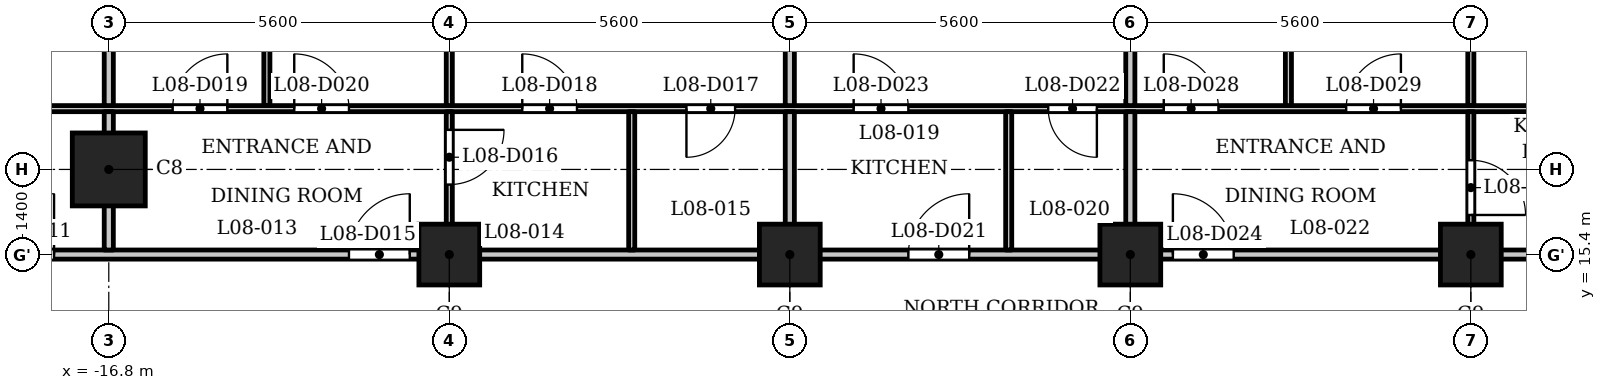
"""IFC4 building model, lengths in metres.
Left out: names, types, materials, properties, quantities, classifications, styles, units other than length and angle.
Written with IfcOpenShell. Run it as: python <this file> out.ifc"""

import sys

from ifc_helpers import new_model, si_unit, direction, frame, frame_2d, origin, origin_2d, place, context, subcontext, project, spatial, rectangle, extrude, element, fill, save


model = new_model("IFC4")
c1 = context("Model", 3, precision=1e-05, world=origin(), true_north=direction((0.0, 1.0)))
c2 = subcontext(c1, "Body", "Model", "MODEL_VIEW")
j1 = project(units=[si_unit("LENGTHUNIT", "METRE"), si_unit("PLANEANGLEUNIT", "RADIAN")], contexts=[c1])
p1 = place(None, origin())
s1 = spatial("IfcSite", under=j1, at=p1, CompositionType="ELEMENT")
p2 = place(p1, origin())
s2 = spatial("IfcBuilding", under=s1, at=p2, CompositionType="ELEMENT")
p3 = place(p2, frame((0.0, 0.0, 37.5)))
s3 = spatial("IfcBuildingStorey", under=s2, at=p3, CompositionType="ELEMENT", Elevation=37.5)
p4 = place(p3, frame((-16.8, 16.8, 0.0), z_axis=(0.0, 0.0, 1.0), x_axis=(1.0, 0.0, 0.0)))
e1 = element("IfcColumn", 1, at=p4, inside=s3, PredefinedType="COLUMN", context=c2, shape_type="SweptSolid", body=[
    extrude(rectangle(XDim=1.2, YDim=1.2, at=origin_2d()), origin(), (0.0, 0.0, 1.0), 3.5),
])
for number, where, z_axis, x_axis in (
    (2, (-11.2, 15.4, 0.0), (0.0, 0.0, 1.0), (1.0, 0.0, 0.0)),
    (3, (-5.6, 15.4, 0.0), (0.0, 0.0, 1.0), (1.0, 0.0, 0.0)),
    (4, (0.0, 15.4, 0.0), (0.0, 0.0, 1.0), (1.0, 0.0, 0.0)),
    (5, (5.6, 15.4, 0.0), (0.0, 0.0, 1.0), (1.0, 0.0, 0.0)),
):
    element("IfcColumn", number, at=place(p3, frame(where, z_axis=z_axis, x_axis=x_axis)), inside=s3, PredefinedType="COLUMN", context=c2, shape_type="SweptSolid", body=[
        extrude(rectangle(XDim=1.0, YDim=1.0, at=origin_2d()), origin(), (0.0, 0.0, 1.0), 3.5),
    ])
p5 = place(p3, frame((-27.484, 15.4, 0.0), z_axis=(0.0, 0.0, 1.0), x_axis=(1.0, 0.0, 0.0)))
e6 = element("IfcWall", 6, at=p5, inside=s3, PredefinedType="PARTITIONING", context=c2, shape_type="SweptSolid", body=[
    extrude(rectangle(XDim=54.968, YDim=0.15, at=frame_2d((27.484, 0.0))), origin(), (0.0, 0.0, 1.0), 3.2),
])
p6 = place(p5, frame((8.784, 0.0, 0.0)))
e7 = element("IfcOpeningElement", 7, at=p6, cuts=e6, PredefinedType="OPENING", context=c2, shape_type="SweptSolid", body=[
    extrude(rectangle(XDim=1.0, YDim=2.1, at=frame_2d((0.5, 1.05))), frame((0.0, 0.085, 0.0), z_axis=(0.0, -1.0, 0.0), x_axis=(1.0, 0.0, 0.0)), (0.0, 0.0, 1.0), 0.17),
])
p7 = place(p5, frame((14.634, 0.0, 0.0)))
e8 = element("IfcOpeningElement", 8, at=p7, cuts=e6, PredefinedType="OPENING", context=c2, shape_type="SweptSolid", body=[
    extrude(rectangle(XDim=1.0, YDim=2.1, at=frame_2d((0.5, 1.05))), frame((0.0, 0.085, 0.0), z_axis=(0.0, -1.0, 0.0), x_axis=(1.0, 0.0, 0.0)), (0.0, 0.0, 1.0), 0.17),
])
p8 = place(p5, frame((23.834, 0.0, 0.0)))
e9 = element("IfcOpeningElement", 9, at=p8, cuts=e6, PredefinedType="OPENING", context=c2, shape_type="SweptSolid", body=[
    extrude(rectangle(XDim=1.0, YDim=2.1, at=frame_2d((0.5, 1.05))), frame((0.0, 0.085, 0.0), z_axis=(0.0, -1.0, 0.0), x_axis=(1.0, 0.0, 0.0)), (0.0, 0.0, 1.0), 0.17),
])
p9 = place(p5, frame((28.184, 0.0, 0.0)))
e10 = element("IfcOpeningElement", 10, at=p9, cuts=e6, PredefinedType="OPENING", context=c2, shape_type="SweptSolid", body=[
    extrude(rectangle(XDim=1.0, YDim=2.1, at=frame_2d((0.5, 1.05))), frame((0.0, 0.085, 0.0), z_axis=(0.0, -1.0, 0.0), x_axis=(1.0, 0.0, 0.0)), (0.0, 0.0, 1.0), 0.17),
])
p10 = place(p5, frame((41.884, 0.0, 0.0)))
e11 = element("IfcOpeningElement", 11, at=p10, cuts=e6, PredefinedType="OPENING", context=c2, shape_type="SweptSolid", body=[
    extrude(rectangle(XDim=1.0, YDim=2.1, at=frame_2d((0.5, 1.05))), frame((0.0, 0.085, 0.0), z_axis=(0.0, -1.0, 0.0), x_axis=(1.0, 0.0, 0.0)), (0.0, 0.0, 1.0), 0.17),
])
p11 = place(p5, frame((48.234, 0.0, 0.0)))
e12 = element("IfcOpeningElement", 12, at=p11, cuts=e6, PredefinedType="OPENING", context=c2, shape_type="SweptSolid", body=[
    extrude(rectangle(XDim=1.0, YDim=2.1, at=frame_2d((0.5, 1.05))), frame((0.0, 0.085, 0.0), z_axis=(0.0, -1.0, 0.0), x_axis=(1.0, 0.0, 0.0)), (0.0, 0.0, 1.0), 0.17),
])
p12 = place(p3, frame((-26.732, 17.8, 0.0), z_axis=(0.0, 0.0, 1.0), x_axis=(1.0, 0.0, 0.0)))
e13 = element("IfcWall", 13, at=p12, inside=s3, PredefinedType="PARTITIONING", context=c2, shape_type="SweptSolid", body=[
    extrude(rectangle(XDim=53.126, YDim=0.1, at=frame_2d((26.563, 0.0))), origin(), (0.0, 0.0, 1.0), 3.2),
])
p13 = place(p12, frame((2.964, 0.0, 0.0)))
e14 = element("IfcOpeningElement", 14, at=p13, cuts=e13, PredefinedType="OPENING", context=c2, shape_type="SweptSolid", body=[
    extrude(rectangle(XDim=0.8, YDim=2.1, at=frame_2d((0.4, 1.05))), frame((0.0, 0.06, 0.0), z_axis=(0.0, -1.0, 0.0), x_axis=(1.0, 0.0, 0.0)), (0.0, 0.0, 1.0), 0.12),
])
p14 = place(p12, frame((7.132, 0.0, 0.0)))
e15 = element("IfcOpeningElement", 15, at=p14, cuts=e13, PredefinedType="OPENING", context=c2, shape_type="SweptSolid", body=[
    extrude(rectangle(XDim=0.9, YDim=2.1, at=frame_2d((0.45, 1.05))), frame((0.0, 0.06, 0.0), z_axis=(0.0, -1.0, 0.0), x_axis=(1.0, 0.0, 0.0)), (0.0, 0.0, 1.0), 0.12),
])
p15 = place(p12, frame((19.432, 0.0, 0.0)))
e16 = element("IfcOpeningElement", 16, at=p15, cuts=e13, PredefinedType="OPENING", context=c2, shape_type="SweptSolid", body=[
    extrude(rectangle(XDim=0.8, YDim=2.1, at=frame_2d((0.4, 1.05))), frame((0.0, 0.06, 0.0), z_axis=(0.0, -1.0, 0.0), x_axis=(1.0, 0.0, 0.0)), (0.0, 0.0, 1.0), 0.12),
])
p16 = place(p12, frame((16.732, 0.0, 0.0)))
e17 = element("IfcOpeningElement", 17, at=p16, cuts=e13, PredefinedType="OPENING", context=c2, shape_type="SweptSolid", body=[
    extrude(rectangle(XDim=0.9, YDim=2.1, at=frame_2d((0.45, 1.05))), frame((0.0, 0.06, 0.0), z_axis=(0.0, -1.0, 0.0), x_axis=(1.0, 0.0, 0.0)), (0.0, 0.0, 1.0), 0.12),
])
p17 = place(p12, frame((10.982, 0.0, 0.0)))
e18 = element("IfcOpeningElement", 18, at=p17, cuts=e13, PredefinedType="OPENING", context=c2, shape_type="SweptSolid", body=[
    extrude(rectangle(XDim=0.9, YDim=2.1, at=frame_2d((0.45, 1.05))), frame((0.0, 0.06, 0.0), z_axis=(0.0, -1.0, 0.0), x_axis=(1.0, 0.0, 0.0)), (0.0, 0.0, 1.0), 0.12),
])
p18 = place(p12, frame((12.982, 0.0, 0.0)))
e19 = element("IfcOpeningElement", 19, at=p18, cuts=e13, PredefinedType="OPENING", context=c2, shape_type="SweptSolid", body=[
    extrude(rectangle(XDim=0.9, YDim=2.1, at=frame_2d((0.45, 1.05))), frame((0.0, 0.06, 0.0), z_axis=(0.0, -1.0, 0.0), x_axis=(1.0, 0.0, 0.0)), (0.0, 0.0, 1.0), 0.12),
])
p19 = place(p12, frame((25.382, 0.0, 0.0)))
e20 = element("IfcOpeningElement", 20, at=p19, cuts=e13, PredefinedType="OPENING", context=c2, shape_type="SweptSolid", body=[
    extrude(rectangle(XDim=0.8, YDim=2.1, at=frame_2d((0.4, 1.05))), frame((0.0, 0.06, 0.0), z_axis=(0.0, -1.0, 0.0), x_axis=(1.0, 0.0, 0.0)), (0.0, 0.0, 1.0), 0.12),
])
p20 = place(p12, frame((22.182, 0.0, 0.0)))
e21 = element("IfcOpeningElement", 21, at=p20, cuts=e13, PredefinedType="OPENING", context=c2, shape_type="SweptSolid", body=[
    extrude(rectangle(XDim=0.9, YDim=2.1, at=frame_2d((0.45, 1.05))), frame((0.0, 0.06, 0.0), z_axis=(0.0, -1.0, 0.0), x_axis=(1.0, 0.0, 0.0)), (0.0, 0.0, 1.0), 0.12),
])
p21 = place(p12, frame((36.232, 0.0, 0.0)))
e22 = element("IfcOpeningElement", 22, at=p21, cuts=e13, PredefinedType="OPENING", context=c2, shape_type="SweptSolid", body=[
    extrude(rectangle(XDim=0.8, YDim=2.1, at=frame_2d((0.4, 1.05))), frame((0.0, 0.06, 0.0), z_axis=(0.0, -1.0, 0.0), x_axis=(1.0, 0.0, 0.0)), (0.0, 0.0, 1.0), 0.12),
])
p22 = place(p12, frame((33.782, 0.0, 0.0)))
e23 = element("IfcOpeningElement", 23, at=p22, cuts=e13, PredefinedType="OPENING", context=c2, shape_type="SweptSolid", body=[
    extrude(rectangle(XDim=0.9, YDim=2.1, at=frame_2d((0.45, 1.05))), frame((0.0, 0.06, 0.0), z_axis=(0.0, -1.0, 0.0), x_axis=(1.0, 0.0, 0.0)), (0.0, 0.0, 1.0), 0.12),
])
p23 = place(p12, frame((27.282, 0.0, 0.0)))
e24 = element("IfcOpeningElement", 24, at=p23, cuts=e13, PredefinedType="OPENING", context=c2, shape_type="SweptSolid", body=[
    extrude(rectangle(XDim=0.9, YDim=2.1, at=frame_2d((0.45, 1.05))), frame((0.0, 0.06, 0.0), z_axis=(0.0, -1.0, 0.0), x_axis=(1.0, 0.0, 0.0)), (0.0, 0.0, 1.0), 0.12),
])
p24 = place(p12, frame((30.282, 0.0, 0.0)))
e25 = element("IfcOpeningElement", 25, at=p24, cuts=e13, PredefinedType="OPENING", context=c2, shape_type="SweptSolid", body=[
    extrude(rectangle(XDim=0.9, YDim=2.1, at=frame_2d((0.45, 1.05))), frame((0.0, 0.06, 0.0), z_axis=(0.0, -1.0, 0.0), x_axis=(1.0, 0.0, 0.0)), (0.0, 0.0, 1.0), 0.12),
])
p25 = place(p12, frame((38.582, 0.0, 0.0)))
e26 = element("IfcOpeningElement", 26, at=p25, cuts=e13, PredefinedType="OPENING", context=c2, shape_type="SweptSolid", body=[
    extrude(rectangle(XDim=0.8, YDim=2.1, at=frame_2d((0.4, 1.05))), frame((0.0, 0.06, 0.0), z_axis=(0.0, -1.0, 0.0), x_axis=(1.0, 0.0, 0.0)), (0.0, 0.0, 1.0), 0.12),
])
p26 = place(p12, frame((41.232, 0.0, 0.0)))
e27 = element("IfcOpeningElement", 27, at=p26, cuts=e13, PredefinedType="OPENING", context=c2, shape_type="SweptSolid", body=[
    extrude(rectangle(XDim=0.9, YDim=2.1, at=frame_2d((0.45, 1.05))), frame((0.0, 0.06, 0.0), z_axis=(0.0, -1.0, 0.0), x_axis=(1.0, 0.0, 0.0)), (0.0, 0.0, 1.0), 0.12),
])
p27 = place(p12, frame((51.532, 0.0, 0.0)))
e28 = element("IfcOpeningElement", 28, at=p27, cuts=e13, PredefinedType="OPENING", context=c2, shape_type="SweptSolid", body=[
    extrude(rectangle(XDim=0.8, YDim=2.1, at=frame_2d((0.4, 1.05))), frame((0.0, 0.06, 0.0), z_axis=(0.0, -1.0, 0.0), x_axis=(1.0, 0.0, 0.0)), (0.0, 0.0, 1.0), 0.12),
])
p28 = place(p12, frame((46.582, 0.0, 0.0)))
e29 = element("IfcOpeningElement", 29, at=p28, cuts=e13, PredefinedType="OPENING", context=c2, shape_type="SweptSolid", body=[
    extrude(rectangle(XDim=0.9, YDim=2.1, at=frame_2d((0.45, 1.05))), frame((0.0, 0.06, 0.0), z_axis=(0.0, -1.0, 0.0), x_axis=(1.0, 0.0, 0.0)), (0.0, 0.0, 1.0), 0.12),
])
p29 = place(p3, frame((-16.8, 15.475, 0.0), z_axis=(0.0, 0.0, 1.0), x_axis=(0.0, 1.0, 0.0)))
e30 = element("IfcWall", 30, at=p29, inside=s3, PredefinedType="PARTITIONING", context=c2, shape_type="SweptSolid", body=[
    extrude(rectangle(XDim=2.275, YDim=0.15, at=frame_2d((1.137, 0.0))), origin(), (0.0, 0.0, 1.0), 3.2),
])
p30 = place(p3, frame((-16.8, 17.85, 0.0), z_axis=(0.0, 0.0, 1.0), x_axis=(0.0, 1.0, 0.0)))
e31 = element("IfcWall", 31, at=p30, inside=s3, PredefinedType="PARTITIONING", context=c2, shape_type="SweptSolid", body=[
    extrude(rectangle(XDim=5.28, YDim=0.15, at=frame_2d((2.64, 0.0))), origin(), (0.0, 0.0, 1.0), 3.2),
])
p31 = place(p3, frame((-14.2, 17.85, 0.0), z_axis=(0.0, 0.0, 1.0), x_axis=(0.0, 1.0, 0.0)))
e32 = element("IfcWall", 32, at=p31, inside=s3, PredefinedType="PARTITIONING", context=c2, shape_type="SweptSolid", body=[
    extrude(rectangle(XDim=4.23, YDim=0.1, at=frame_2d((2.115, 0.0))), origin(), (0.0, 0.0, 1.0), 3.2),
])
p32 = place(p3, frame((-11.2, 15.475, 0.0), z_axis=(0.0, 0.0, 1.0), x_axis=(0.0, 1.0, 0.0)))
e33 = element("IfcWall", 33, at=p32, inside=s3, PredefinedType="PARTITIONING", context=c2, shape_type="SweptSolid", body=[
    extrude(rectangle(XDim=2.275, YDim=0.1, at=frame_2d((1.137, 0.0))), origin(), (0.0, 0.0, 1.0), 3.2),
])
p33 = place(p32, frame((1.076, 0.0, 0.0)))
e34 = element("IfcOpeningElement", 34, at=p33, cuts=e33, PredefinedType="OPENING", context=c2, shape_type="SweptSolid", body=[
    extrude(rectangle(XDim=0.9, YDim=2.1, at=frame_2d((0.45, 1.05))), frame((0.0, 0.06, 0.0), z_axis=(0.0, -1.0, 0.0), x_axis=(1.0, 0.0, 0.0)), (0.0, 0.0, 1.0), 0.12),
])
p34 = place(p3, frame((-11.2, 17.85, 0.0), z_axis=(0.0, 0.0, 1.0), x_axis=(0.0, 1.0, 0.0)))
e35 = element("IfcWall", 35, at=p34, inside=s3, PredefinedType="PARTITIONING", context=c2, shape_type="SweptSolid", body=[
    extrude(rectangle(XDim=5.28, YDim=0.1, at=frame_2d((2.64, 0.0))), origin(), (0.0, 0.0, 1.0), 3.2),
])
p35 = place(p3, frame((-8.2, 15.475, 0.0), z_axis=(0.0, 0.0, 1.0), x_axis=(0.0, 1.0, 0.0)))
e36 = element("IfcWall", 36, at=p35, inside=s3, PredefinedType="PARTITIONING", context=c2, shape_type="SweptSolid", body=[
    extrude(rectangle(XDim=2.275, YDim=0.1, at=frame_2d((1.137, 0.0))), origin(), (0.0, 0.0, 1.0), 3.2),
])
p36 = place(p3, frame((-5.6, 15.475, 0.0), z_axis=(0.0, 0.0, 1.0), x_axis=(0.0, 1.0, 0.0)))
e37 = element("IfcWall", 37, at=p36, inside=s3, PredefinedType="PARTITIONING", context=c2, shape_type="SweptSolid", body=[
    extrude(rectangle(XDim=2.275, YDim=0.15, at=frame_2d((1.137, 0.0))), origin(), (0.0, 0.0, 1.0), 3.2),
])
p37 = place(p3, frame((-5.6, 17.85, 0.0), z_axis=(0.0, 0.0, 1.0), x_axis=(0.0, 1.0, 0.0)))
e38 = element("IfcWall", 38, at=p37, inside=s3, PredefinedType="PARTITIONING", context=c2, shape_type="SweptSolid", body=[
    extrude(rectangle(XDim=5.28, YDim=0.15, at=frame_2d((2.64, 0.0))), origin(), (0.0, 0.0, 1.0), 3.2),
])
p38 = place(p3, frame((-2.0, 15.475, 0.0), z_axis=(0.0, 0.0, 1.0), x_axis=(0.0, 1.0, 0.0)))
e39 = element("IfcWall", 39, at=p38, inside=s3, PredefinedType="PARTITIONING", context=c2, shape_type="SweptSolid", body=[
    extrude(rectangle(XDim=2.275, YDim=0.1, at=frame_2d((1.137, 0.0))), origin(), (0.0, 0.0, 1.0), 3.2),
])
p39 = place(p3, frame((0.0, 15.475, 0.0), z_axis=(0.0, 0.0, 1.0), x_axis=(0.0, 1.0, 0.0)))
e40 = element("IfcWall", 40, at=p39, inside=s3, PredefinedType="PARTITIONING", context=c2, shape_type="SweptSolid", body=[
    extrude(rectangle(XDim=2.275, YDim=0.15, at=frame_2d((1.137, 0.0))), origin(), (0.0, 0.0, 1.0), 3.2),
])
p40 = place(p3, frame((0.0, 17.85, 0.0), z_axis=(0.0, 0.0, 1.0), x_axis=(0.0, 1.0, 0.0)))
e41 = element("IfcWall", 41, at=p40, inside=s3, PredefinedType="PARTITIONING", context=c2, shape_type="SweptSolid", body=[
    extrude(rectangle(XDim=5.28, YDim=0.15, at=frame_2d((2.64, 0.0))), origin(), (0.0, 0.0, 1.0), 3.2),
])
p41 = place(p3, frame((2.6, 17.85, 0.0), z_axis=(0.0, 0.0, 1.0), x_axis=(0.0, 1.0, 0.0)))
e42 = element("IfcWall", 42, at=p41, inside=s3, PredefinedType="PARTITIONING", context=c2, shape_type="SweptSolid", body=[
    extrude(rectangle(XDim=4.23, YDim=0.1, at=frame_2d((2.115, 0.0))), origin(), (0.0, 0.0, 1.0), 3.2),
])
p42 = place(p3, frame((5.6, 15.475, 0.0), z_axis=(0.0, 0.0, 1.0), x_axis=(0.0, 1.0, 0.0)))
e43 = element("IfcWall", 43, at=p42, inside=s3, PredefinedType="PARTITIONING", context=c2, shape_type="SweptSolid", body=[
    extrude(rectangle(XDim=2.275, YDim=0.1, at=frame_2d((1.137, 0.0))), origin(), (0.0, 0.0, 1.0), 3.2),
])
p43 = place(p42, frame((0.576, 0.0, 0.0)))
e44 = element("IfcOpeningElement", 44, at=p43, cuts=e43, PredefinedType="OPENING", context=c2, shape_type="SweptSolid", body=[
    extrude(rectangle(XDim=0.9, YDim=2.1, at=frame_2d((0.45, 1.05))), frame((0.0, 0.06, 0.0), z_axis=(0.0, -1.0, 0.0), x_axis=(1.0, 0.0, 0.0)), (0.0, 0.0, 1.0), 0.12),
])
p44 = place(p3, frame((5.6, 17.85, 0.0), z_axis=(0.0, 0.0, 1.0), x_axis=(0.0, 1.0, 0.0)))
e45 = element("IfcWall", 45, at=p44, inside=s3, PredefinedType="PARTITIONING", context=c2, shape_type="SweptSolid", body=[
    extrude(rectangle(XDim=5.28, YDim=0.1, at=frame_2d((2.64, 0.0))), origin(), (0.0, 0.0, 1.0), 3.2),
])
p45 = place(p6, origin())
e46 = element("IfcDoor", 46, at=p45, inside=s3, OperationType="SINGLE_SWING_LEFT", PredefinedType="DOOR", context=c2, shape_type="SweptSolid", body=[
    extrude(rectangle(XDim=1.0, YDim=2.1, at=frame_2d((0.5, 1.05))), frame((0.0, 0.025, 0.0), z_axis=(0.0, -1.0, 0.0), x_axis=(1.0, 0.0, 0.0)), (0.0, 0.0, 1.0), 0.05),
])
fill(e7, e46)
p46 = place(p7, origin())
e47 = element("IfcDoor", 47, at=p46, inside=s3, OperationType="SINGLE_SWING_LEFT", PredefinedType="DOOR", context=c2, shape_type="SweptSolid", body=[
    extrude(rectangle(XDim=1.0, YDim=2.1, at=frame_2d((0.5, 1.05))), frame((0.0, 0.025, 0.0), z_axis=(0.0, -1.0, 0.0), x_axis=(1.0, 0.0, 0.0)), (0.0, 0.0, 1.0), 0.05),
])
fill(e8, e47)
p47 = place(p33, origin())
e48 = element("IfcDoor", 48, at=p47, inside=s3, OperationType="SINGLE_SWING_RIGHT", PredefinedType="DOOR", context=c2, shape_type="SweptSolid", body=[
    extrude(rectangle(XDim=0.9, YDim=2.1, at=frame_2d((0.45, 1.05))), frame((0.0, 0.025, 0.0), z_axis=(0.0, -1.0, 0.0), x_axis=(1.0, 0.0, 0.0)), (0.0, 0.0, 1.0), 0.05),
])
fill(e34, e48)
p48 = place(p15, origin())
e49 = element("IfcDoor", 49, at=p48, inside=s3, OperationType="SINGLE_SWING_LEFT", PredefinedType="DOOR", context=c2, shape_type="SweptSolid", body=[
    extrude(rectangle(XDim=0.8, YDim=2.1, at=frame_2d((0.4, 1.05))), frame((0.0, 0.025, 0.0), z_axis=(0.0, -1.0, 0.0), x_axis=(1.0, 0.0, 0.0)), (0.0, 0.0, 1.0), 0.05),
])
fill(e16, e49)
p49 = place(p16, origin())
e50 = element("IfcDoor", 50, at=p49, inside=s3, OperationType="SINGLE_SWING_RIGHT", PredefinedType="DOOR", context=c2, shape_type="SweptSolid", body=[
    extrude(rectangle(XDim=0.9, YDim=2.1, at=frame_2d((0.45, 1.05))), frame((0.0, 0.025, 0.0), z_axis=(0.0, -1.0, 0.0), x_axis=(1.0, 0.0, 0.0)), (0.0, 0.0, 1.0), 0.05),
])
fill(e17, e50)
p50 = place(p17, origin())
e51 = element("IfcDoor", 51, at=p50, inside=s3, OperationType="SINGLE_SWING_LEFT", PredefinedType="DOOR", context=c2, shape_type="SweptSolid", body=[
    extrude(rectangle(XDim=0.9, YDim=2.1, at=frame_2d((0.45, 1.05))), frame((0.0, 0.025, 0.0), z_axis=(0.0, -1.0, 0.0), x_axis=(1.0, 0.0, 0.0)), (0.0, 0.0, 1.0), 0.05),
])
fill(e18, e51)
p51 = place(p18, origin())
e52 = element("IfcDoor", 52, at=p51, inside=s3, OperationType="SINGLE_SWING_RIGHT", PredefinedType="DOOR", context=c2, shape_type="SweptSolid", body=[
    extrude(rectangle(XDim=0.9, YDim=2.1, at=frame_2d((0.45, 1.05))), frame((0.0, 0.025, 0.0), z_axis=(0.0, -1.0, 0.0), x_axis=(1.0, 0.0, 0.0)), (0.0, 0.0, 1.0), 0.05),
])
fill(e19, e52)
p52 = place(p8, origin())
e53 = element("IfcDoor", 53, at=p52, inside=s3, OperationType="SINGLE_SWING_LEFT", PredefinedType="DOOR", context=c2, shape_type="SweptSolid", body=[
    extrude(rectangle(XDim=1.0, YDim=2.1, at=frame_2d((0.5, 1.05))), frame((0.0, 0.025, 0.0), z_axis=(0.0, -1.0, 0.0), x_axis=(1.0, 0.0, 0.0)), (0.0, 0.0, 1.0), 0.05),
])
fill(e9, e53)
p53 = place(p19, origin())
e54 = element("IfcDoor", 54, at=p53, inside=s3, OperationType="SINGLE_SWING_RIGHT", PredefinedType="DOOR", context=c2, shape_type="SweptSolid", body=[
    extrude(rectangle(XDim=0.8, YDim=2.1, at=frame_2d((0.4, 1.05))), frame((0.0, 0.025, 0.0), z_axis=(0.0, -1.0, 0.0), x_axis=(1.0, 0.0, 0.0)), (0.0, 0.0, 1.0), 0.05),
])
fill(e20, e54)
p54 = place(p20, origin())
e55 = element("IfcDoor", 55, at=p54, inside=s3, OperationType="SINGLE_SWING_RIGHT", PredefinedType="DOOR", context=c2, shape_type="SweptSolid", body=[
    extrude(rectangle(XDim=0.9, YDim=2.1, at=frame_2d((0.45, 1.05))), frame((0.0, 0.025, 0.0), z_axis=(0.0, -1.0, 0.0), x_axis=(1.0, 0.0, 0.0)), (0.0, 0.0, 1.0), 0.05),
])
fill(e21, e55)
p55 = place(p9, origin())
e56 = element("IfcDoor", 56, at=p55, inside=s3, OperationType="SINGLE_SWING_RIGHT", PredefinedType="DOOR", context=c2, shape_type="SweptSolid", body=[
    extrude(rectangle(XDim=1.0, YDim=2.1, at=frame_2d((0.5, 1.05))), frame((0.0, 0.025, 0.0), z_axis=(0.0, -1.0, 0.0), x_axis=(1.0, 0.0, 0.0)), (0.0, 0.0, 1.0), 0.05),
])
fill(e10, e56)
p56 = place(p43, origin())
e57 = element("IfcDoor", 57, at=p56, inside=s3, OperationType="SINGLE_SWING_LEFT", PredefinedType="DOOR", context=c2, shape_type="SweptSolid", body=[
    extrude(rectangle(XDim=0.9, YDim=2.1, at=frame_2d((0.45, 1.05))), frame((0.0, 0.025, 0.0), z_axis=(0.0, -1.0, 0.0), x_axis=(1.0, 0.0, 0.0)), (0.0, 0.0, 1.0), 0.05),
])
fill(e44, e57)
p57 = place(p23, origin())
e58 = element("IfcDoor", 58, at=p57, inside=s3, OperationType="SINGLE_SWING_RIGHT", PredefinedType="DOOR", context=c2, shape_type="SweptSolid", body=[
    extrude(rectangle(XDim=0.9, YDim=2.1, at=frame_2d((0.45, 1.05))), frame((0.0, 0.025, 0.0), z_axis=(0.0, -1.0, 0.0), x_axis=(1.0, 0.0, 0.0)), (0.0, 0.0, 1.0), 0.05),
])
fill(e24, e58)
p58 = place(p24, origin())
e59 = element("IfcDoor", 59, at=p58, inside=s3, OperationType="SINGLE_SWING_LEFT", PredefinedType="DOOR", context=c2, shape_type="SweptSolid", body=[
    extrude(rectangle(XDim=0.9, YDim=2.1, at=frame_2d((0.45, 1.05))), frame((0.0, 0.025, 0.0), z_axis=(0.0, -1.0, 0.0), x_axis=(1.0, 0.0, 0.0)), (0.0, 0.0, 1.0), 0.05),
])
fill(e25, e59)
save(model, sys.argv[1])
